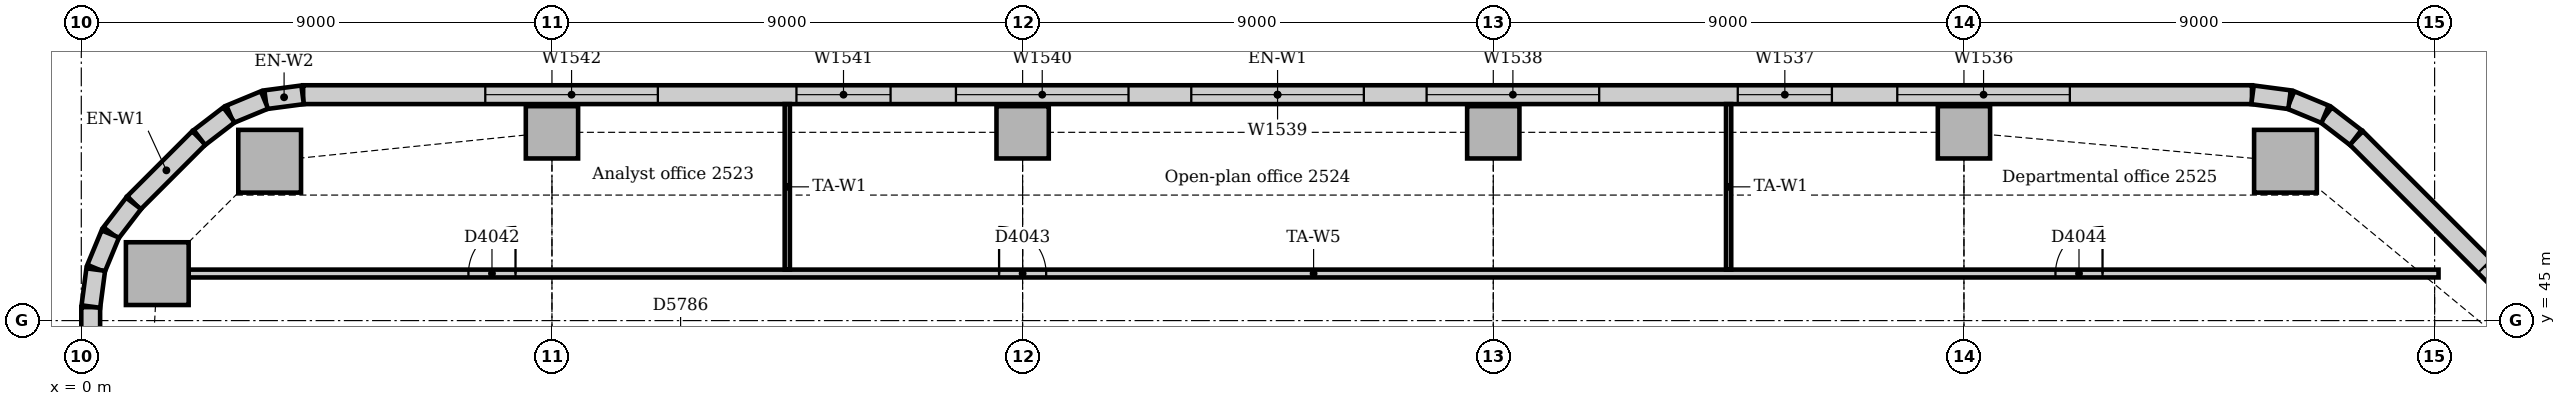
"""IFC4 building model, lengths in metres.
Left out: names, types, materials, properties, quantities, classifications, styles, units other than length and angle.
Written with IfcOpenShell. Run it as: python <this file> out.ifc"""

import sys

from ifc_helpers import new_model, si_unit, direction, frame, frame_2d, origin, origin_2d, place, context, subcontext, project, spatial, rectangle, extrude, element, fill, save


model = new_model("IFC4")
c1 = context("Model", 3, precision=1e-05, world=origin(), true_north=direction((0.0, 1.0)))
c2 = subcontext(c1, "Body", "Model", "MODEL_VIEW")
j1 = project(units=[si_unit("LENGTHUNIT", "METRE"), si_unit("PLANEANGLEUNIT", "RADIAN")], contexts=[c1])
p1 = place(None, origin())
s1 = spatial("IfcSite", under=j1, at=p1, CompositionType="ELEMENT")
p2 = place(p1, origin())
s2 = spatial("IfcBuilding", under=s1, at=p2, CompositionType="ELEMENT")
p3 = place(p2, frame((0.0, 0.0, 108.0)))
s3 = spatial("IfcBuildingStorey", under=s2, at=p3, CompositionType="ELEMENT", Elevation=108.0)
for number, where, z_axis, x_axis in (
    (1, (42.148, 48.047, 0.0), (0.0, 0.0, 1.0), (1.0, 0.0, 0.0)),
    (2, (3.602, 48.047, 0.0), (0.0, 0.0, 1.0), (1.0, 0.0, 0.0)),
    (3, (1.453, 45.898, 0.0), (0.0, 0.0, 1.0), (1.0, 0.0, 0.0)),
):
    element("IfcColumn", number, at=place(p3, frame(where, z_axis=z_axis, x_axis=x_axis)), inside=s3, PredefinedType="COLUMN", context=c2, shape_type="SweptSolid", body=[
        extrude(rectangle(XDim=1.2, YDim=1.2, at=origin_2d()), origin(), (0.0, 0.0, 1.0), 3.85),
    ])
for number, where, z_axis, x_axis in (
    (4, (46.614, 44.364, 0.0), (0.0, 0.0, 1.0), (0.707, 0.707, 0.0)),
    (5, (9.0, 48.6, 0.0), (0.0, 0.0, 1.0), (1.0, 0.0, 0.0)),
    (6, (18.0, 48.6, 0.0), (0.0, 0.0, 1.0), (1.0, 0.0, 0.0)),
    (7, (27.0, 48.6, 0.0), (0.0, 0.0, 1.0), (1.0, 0.0, 0.0)),
    (8, (36.0, 48.6, 0.0), (0.0, 0.0, 1.0), (1.0, 0.0, 0.0)),
):
    element("IfcColumn", number, at=place(p3, frame(where, z_axis=z_axis, x_axis=x_axis)), inside=s3, PredefinedType="COLUMN", context=c2, shape_type="SweptSolid", body=[
        extrude(rectangle(XDim=1.0, YDim=1.0, at=origin_2d()), origin(), (0.0, 0.0, 1.0), 3.85),
    ])
p4 = place(p3, frame((50.744, 41.251, 0.0), z_axis=(0.0, 0.0, 1.0), x_axis=(-0.707106781187, 0.707106781187, 0.0)))
e9 = element("IfcWall", 9, at=p4, inside=s3, PredefinedType="STANDARD", context=c2, shape_type="SweptSolid", body=[
    extrude(rectangle(XDim=10.243, YDim=0.36, at=frame_2d((5.121, 0.0))), origin(), (0.0, 0.0, 1.0), 3.85),
])
p5 = place(p4, frame((3.471, 0.0, 0.9)))
e10 = element("IfcOpeningElement", 10, at=p5, cuts=e9, PredefinedType="OPENING", context=c2, shape_type="SweptSolid", body=[
    extrude(rectangle(XDim=3.3, YDim=1.6, at=frame_2d((1.65, 0.8))), frame((0.0, 0.19, 0.0), z_axis=(0.0, -1.0, 0.0), x_axis=(1.0, 0.0, 0.0)), (0.0, 0.0, 1.0), 0.38),
])
p6 = place(p3, frame((41.507, 49.32, 0.0), z_axis=(0.0, 0.0, 1.0), x_axis=(-1.0, 0.0, 0.0)))
e11 = element("IfcWall", 11, at=p6, inside=s3, PredefinedType="STANDARD", context=c2, shape_type="SweptSolid", body=[
    extrude(rectangle(XDim=37.265, YDim=0.36, at=frame_2d((18.632, 0.0))), origin(), (0.0, 0.0, 1.0), 3.85),
])
p7 = place(p6, frame((3.482, 0.0, 0.9)))
e12 = element("IfcOpeningElement", 12, at=p7, cuts=e11, PredefinedType="OPENING", context=c2, shape_type="SweptSolid", body=[
    extrude(rectangle(XDim=3.3, YDim=1.6, at=frame_2d((1.65, 0.8))), frame((0.0, 0.19, 0.0), z_axis=(0.0, -1.0, 0.0), x_axis=(1.0, 0.0, 0.0)), (0.0, 0.0, 1.0), 0.38),
])
p8 = place(p6, frame((8.032, 0.0, 0.9)))
e13 = element("IfcOpeningElement", 13, at=p8, cuts=e11, PredefinedType="OPENING", context=c2, shape_type="SweptSolid", body=[
    extrude(rectangle(XDim=1.8, YDim=1.6, at=frame_2d((0.9, 0.8))), frame((0.0, 0.19, 0.0), z_axis=(0.0, -1.0, 0.0), x_axis=(1.0, 0.0, 0.0)), (0.0, 0.0, 1.0), 0.38),
])
p9 = place(p6, frame((12.482, 0.0, 0.9)))
e14 = element("IfcOpeningElement", 14, at=p9, cuts=e11, PredefinedType="OPENING", context=c2, shape_type="SweptSolid", body=[
    extrude(rectangle(XDim=3.3, YDim=1.6, at=frame_2d((1.65, 0.8))), frame((0.0, 0.19, 0.0), z_axis=(0.0, -1.0, 0.0), x_axis=(1.0, 0.0, 0.0)), (0.0, 0.0, 1.0), 0.38),
])
p10 = place(p6, frame((16.982, 0.0, 0.9)))
e15 = element("IfcOpeningElement", 15, at=p10, cuts=e11, PredefinedType="OPENING", context=c2, shape_type="SweptSolid", body=[
    extrude(rectangle(XDim=3.3, YDim=1.6, at=frame_2d((1.65, 0.8))), frame((0.0, 0.19, 0.0), z_axis=(0.0, -1.0, 0.0), x_axis=(1.0, 0.0, 0.0)), (0.0, 0.0, 1.0), 0.38),
])
p11 = place(p6, frame((21.482, 0.0, 0.9)))
e16 = element("IfcOpeningElement", 16, at=p11, cuts=e11, PredefinedType="OPENING", context=c2, shape_type="SweptSolid", body=[
    extrude(rectangle(XDim=3.3, YDim=1.6, at=frame_2d((1.65, 0.8))), frame((0.0, 0.19, 0.0), z_axis=(0.0, -1.0, 0.0), x_axis=(1.0, 0.0, 0.0)), (0.0, 0.0, 1.0), 0.38),
])
p12 = place(p6, frame((26.032, 0.0, 0.9)))
e17 = element("IfcOpeningElement", 17, at=p12, cuts=e11, PredefinedType="OPENING", context=c2, shape_type="SweptSolid", body=[
    extrude(rectangle(XDim=1.8, YDim=1.6, at=frame_2d((0.9, 0.8))), frame((0.0, 0.19, 0.0), z_axis=(0.0, -1.0, 0.0), x_axis=(1.0, 0.0, 0.0)), (0.0, 0.0, 1.0), 0.38),
])
p13 = place(p6, frame((30.482, 0.0, 0.9)))
e18 = element("IfcOpeningElement", 18, at=p13, cuts=e11, PredefinedType="OPENING", context=c2, shape_type="SweptSolid", body=[
    extrude(rectangle(XDim=3.3, YDim=1.6, at=frame_2d((1.65, 0.8))), frame((0.0, 0.19, 0.0), z_axis=(0.0, -1.0, 0.0), x_axis=(1.0, 0.0, 0.0)), (0.0, 0.0, 1.0), 0.38),
])
p14 = place(p3, frame((2.249, 48.494, 0.0), z_axis=(0.0, 0.0, 1.0), x_axis=(-0.707106781187, -0.707106781187, 0.0)))
e19 = element("IfcWall", 19, at=p14, inside=s3, PredefinedType="STANDARD", context=c2, shape_type="SweptSolid", body=[
    extrude(rectangle(XDim=1.757, YDim=0.36, at=frame_2d((0.879, 0.0))), origin(), (0.0, 0.0, 1.0), 3.85),
])
p15 = place(p3, frame((0.18, 45.257, 0.0), z_axis=(0.0, 0.0, 1.0), x_axis=(0.0, -1.0, 0.0)))
e20 = element("IfcWall", 20, at=p15, inside=s3, PredefinedType="STANDARD", context=c2, shape_type="SweptSolid", body=[
    extrude(rectangle(XDim=3.257, YDim=0.36, at=frame_2d((1.629, 0.0))), origin(), (0.0, 0.0, 1.0), 3.85),
])
p16 = place(p3, frame((43.491, 48.5, 0.0), z_axis=(0.0, 0.0, 1.0), x_axis=(-0.793321924995, 0.608802368033, 0.0)))
e21 = element("IfcWall", 21, at=p16, inside=s3, PredefinedType="STANDARD", context=c2, shape_type="SweptSolid", body=[
    extrude(rectangle(XDim=0.713, YDim=0.36, at=frame_2d((0.357, 0.0))), origin(), (0.0, 0.0, 1.0), 3.85),
])
for number, where, z_axis, x_axis in (
    (22, (42.906, 48.945, 0.0), (0.0, 0.0, 1.0), (-0.924, 0.383, 0.0)),
    (23, (42.226, 49.224, 0.0), (0.0, 0.0, 1.0), (-0.991, 0.131, 0.0)),
    (24, (4.231, 49.317, 0.0), (0.0, 0.0, 1.0), (-0.991, -0.131, 0.0)),
    (25, (3.503, 49.218, 0.0), (0.0, 0.0, 1.0), (-0.924, -0.383, 0.0)),
):
    element("IfcWall", number, at=place(p3, frame(where, z_axis=z_axis, x_axis=x_axis)), inside=s3, PredefinedType="STANDARD", context=c2, shape_type="SweptSolid", body=[
        extrude(rectangle(XDim=0.713, YDim=0.36, at=frame_2d((0.356, 0.0))), origin(), (0.0, 0.0, 1.0), 3.85),
    ])
for number, where, z_axis, x_axis in (
    (26, (2.825, 48.934, 0.0), (0.0, 0.0, 1.0), (-0.793, -0.609, 0.0)),
    (27, (1.0, 47.241, 0.0), (0.0, 0.0, 1.0), (-0.609, -0.793, 0.0)),
):
    element("IfcWall", number, at=place(p3, frame(where, z_axis=z_axis, x_axis=x_axis)), inside=s3, PredefinedType="STANDARD", context=c2, shape_type="SweptSolid", body=[
        extrude(rectangle(XDim=0.713, YDim=0.36, at=frame_2d((0.357, 0.0))), origin(), (0.0, 0.0, 1.0), 3.85),
    ])
for number, where, z_axis, x_axis in (
    (28, (0.555, 46.656, 0.0), (0.0, 0.0, 1.0), (-0.383, -0.924, 0.0)),
    (29, (0.276, 45.976, 0.0), (0.0, 0.0, 1.0), (-0.131, -0.991, 0.0)),
):
    element("IfcWall", number, at=place(p3, frame(where, z_axis=z_axis, x_axis=x_axis)), inside=s3, PredefinedType="STANDARD", context=c2, shape_type="SweptSolid", body=[
        extrude(rectangle(XDim=0.713, YDim=0.36, at=frame_2d((0.356, 0.0))), origin(), (0.0, 0.0, 1.0), 3.85),
    ])
p17 = place(p3, frame((2.053, 45.9, 0.0), z_axis=(0.0, 0.0, 1.0), x_axis=(1.0, 0.0, 0.0)))
e30 = element("IfcWall", 30, at=p17, inside=s3, PredefinedType="PARTITIONING", context=c2, shape_type="SweptSolid", body=[
    extrude(rectangle(XDim=43.022, YDim=0.15, at=frame_2d((21.511, 0.0))), origin(), (0.0, 0.0, 1.0), 3.85),
])
p18 = place(p17, frame((5.35, 0.0, 0.0)))
e31 = element("IfcOpeningElement", 31, at=p18, cuts=e30, PredefinedType="OPENING", context=c2, shape_type="SweptSolid", body=[
    extrude(rectangle(XDim=0.9, YDim=2.1, at=frame_2d((0.45, 1.05))), frame((0.0, 0.085, 0.0), z_axis=(0.0, -1.0, 0.0), x_axis=(1.0, 0.0, 0.0)), (0.0, 0.0, 1.0), 0.17),
])
p19 = place(p17, frame((15.497, 0.0, 0.0)))
e32 = element("IfcOpeningElement", 32, at=p19, cuts=e30, PredefinedType="OPENING", context=c2, shape_type="SweptSolid", body=[
    extrude(rectangle(XDim=0.9, YDim=2.1, at=frame_2d((0.45, 1.05))), frame((0.0, 0.085, 0.0), z_axis=(0.0, -1.0, 0.0), x_axis=(1.0, 0.0, 0.0)), (0.0, 0.0, 1.0), 0.17),
])
p20 = place(p17, frame((35.697, 0.0, 0.0)))
e33 = element("IfcOpeningElement", 33, at=p20, cuts=e30, PredefinedType="OPENING", context=c2, shape_type="SweptSolid", body=[
    extrude(rectangle(XDim=0.9, YDim=2.1, at=frame_2d((0.45, 1.05))), frame((0.0, 0.085, 0.0), z_axis=(0.0, -1.0, 0.0), x_axis=(1.0, 0.0, 0.0)), (0.0, 0.0, 1.0), 0.17),
])
for number, where, z_axis, x_axis in (
    (34, (13.5, 45.975, 0.0), (0.0, 0.0, 1.0), (0.0, 1.0, 0.0)),
    (35, (31.5, 45.975, 0.0), (0.0, 0.0, 1.0), (0.0, 1.0, 0.0)),
):
    element("IfcWall", number, at=place(p3, frame(where, z_axis=z_axis, x_axis=x_axis)), inside=s3, PredefinedType="PARTITIONING", context=c2, shape_type="SweptSolid", body=[
        extrude(rectangle(XDim=3.165, YDim=0.1, at=frame_2d((1.583, 0.0))), origin(), (0.0, 0.0, 1.0), 3.85),
    ])
p21 = place(p5, origin())
e36 = element("IfcWindow", 36, at=p21, inside=s3, PartitioningType="SINGLE_PANEL", PredefinedType="WINDOW", context=c2, shape_type="SweptSolid", body=[
    extrude(rectangle(XDim=3.3, YDim=1.6, at=frame_2d((1.65, 0.8))), frame((0.0, 0.13, 0.0), z_axis=(0.0, -1.0, 0.0), x_axis=(1.0, 0.0, 0.0)), (0.0, 0.0, 1.0), 0.06),
])
fill(e10, e36)
p22 = place(p7, origin())
e37 = element("IfcWindow", 37, at=p22, inside=s3, PartitioningType="SINGLE_PANEL", PredefinedType="WINDOW", context=c2, shape_type="SweptSolid", body=[
    extrude(rectangle(XDim=3.3, YDim=1.6, at=frame_2d((1.65, 0.8))), frame((0.0, 0.13, 0.0), z_axis=(0.0, -1.0, 0.0), x_axis=(1.0, 0.0, 0.0)), (0.0, 0.0, 1.0), 0.06),
])
fill(e12, e37)
p23 = place(p8, origin())
e38 = element("IfcWindow", 38, at=p23, inside=s3, PartitioningType="SINGLE_PANEL", PredefinedType="WINDOW", context=c2, shape_type="SweptSolid", body=[
    extrude(rectangle(XDim=1.8, YDim=1.6, at=frame_2d((0.9, 0.8))), frame((0.0, 0.13, 0.0), z_axis=(0.0, -1.0, 0.0), x_axis=(1.0, 0.0, 0.0)), (0.0, 0.0, 1.0), 0.06),
])
fill(e13, e38)
p24 = place(p9, origin())
e39 = element("IfcWindow", 39, at=p24, inside=s3, PartitioningType="SINGLE_PANEL", PredefinedType="WINDOW", context=c2, shape_type="SweptSolid", body=[
    extrude(rectangle(XDim=3.3, YDim=1.6, at=frame_2d((1.65, 0.8))), frame((0.0, 0.13, 0.0), z_axis=(0.0, -1.0, 0.0), x_axis=(1.0, 0.0, 0.0)), (0.0, 0.0, 1.0), 0.06),
])
fill(e14, e39)
p25 = place(p10, origin())
e40 = element("IfcWindow", 40, at=p25, inside=s3, PartitioningType="SINGLE_PANEL", PredefinedType="WINDOW", context=c2, shape_type="SweptSolid", body=[
    extrude(rectangle(XDim=3.3, YDim=1.6, at=frame_2d((1.65, 0.8))), frame((0.0, 0.13, 0.0), z_axis=(0.0, -1.0, 0.0), x_axis=(1.0, 0.0, 0.0)), (0.0, 0.0, 1.0), 0.06),
])
fill(e15, e40)
p26 = place(p11, origin())
e41 = element("IfcWindow", 41, at=p26, inside=s3, PartitioningType="SINGLE_PANEL", PredefinedType="WINDOW", context=c2, shape_type="SweptSolid", body=[
    extrude(rectangle(XDim=3.3, YDim=1.6, at=frame_2d((1.65, 0.8))), frame((0.0, 0.13, 0.0), z_axis=(0.0, -1.0, 0.0), x_axis=(1.0, 0.0, 0.0)), (0.0, 0.0, 1.0), 0.06),
])
fill(e16, e41)
p27 = place(p12, origin())
e42 = element("IfcWindow", 42, at=p27, inside=s3, PartitioningType="SINGLE_PANEL", PredefinedType="WINDOW", context=c2, shape_type="SweptSolid", body=[
    extrude(rectangle(XDim=1.8, YDim=1.6, at=frame_2d((0.9, 0.8))), frame((0.0, 0.13, 0.0), z_axis=(0.0, -1.0, 0.0), x_axis=(1.0, 0.0, 0.0)), (0.0, 0.0, 1.0), 0.06),
])
fill(e17, e42)
p28 = place(p13, origin())
e43 = element("IfcWindow", 43, at=p28, inside=s3, PartitioningType="SINGLE_PANEL", PredefinedType="WINDOW", context=c2, shape_type="SweptSolid", body=[
    extrude(rectangle(XDim=3.3, YDim=1.6, at=frame_2d((1.65, 0.8))), frame((0.0, 0.13, 0.0), z_axis=(0.0, -1.0, 0.0), x_axis=(1.0, 0.0, 0.0)), (0.0, 0.0, 1.0), 0.06),
])
fill(e18, e43)
p29 = place(p18, origin())
e44 = element("IfcDoor", 44, at=p29, inside=s3, OperationType="SINGLE_SWING_RIGHT", PredefinedType="DOOR", context=c2, shape_type="SweptSolid", body=[
    extrude(rectangle(XDim=0.9, YDim=2.1, at=frame_2d((0.45, 1.05))), frame((0.0, 0.025, 0.0), z_axis=(0.0, -1.0, 0.0), x_axis=(1.0, 0.0, 0.0)), (0.0, 0.0, 1.0), 0.05),
])
fill(e31, e44)
p30 = place(p19, origin())
e45 = element("IfcDoor", 45, at=p30, inside=s3, OperationType="SINGLE_SWING_LEFT", PredefinedType="DOOR", context=c2, shape_type="SweptSolid", body=[
    extrude(rectangle(XDim=0.9, YDim=2.1, at=frame_2d((0.45, 1.05))), frame((0.0, 0.025, 0.0), z_axis=(0.0, -1.0, 0.0), x_axis=(1.0, 0.0, 0.0)), (0.0, 0.0, 1.0), 0.05),
])
fill(e32, e45)
p31 = place(p20, origin())
e46 = element("IfcDoor", 46, at=p31, inside=s3, OperationType="SINGLE_SWING_RIGHT", PredefinedType="DOOR", context=c2, shape_type="SweptSolid", body=[
    extrude(rectangle(XDim=0.9, YDim=2.1, at=frame_2d((0.45, 1.05))), frame((0.0, 0.025, 0.0), z_axis=(0.0, -1.0, 0.0), x_axis=(1.0, 0.0, 0.0)), (0.0, 0.0, 1.0), 0.05),
])
fill(e33, e46)
save(model, sys.argv[1])
